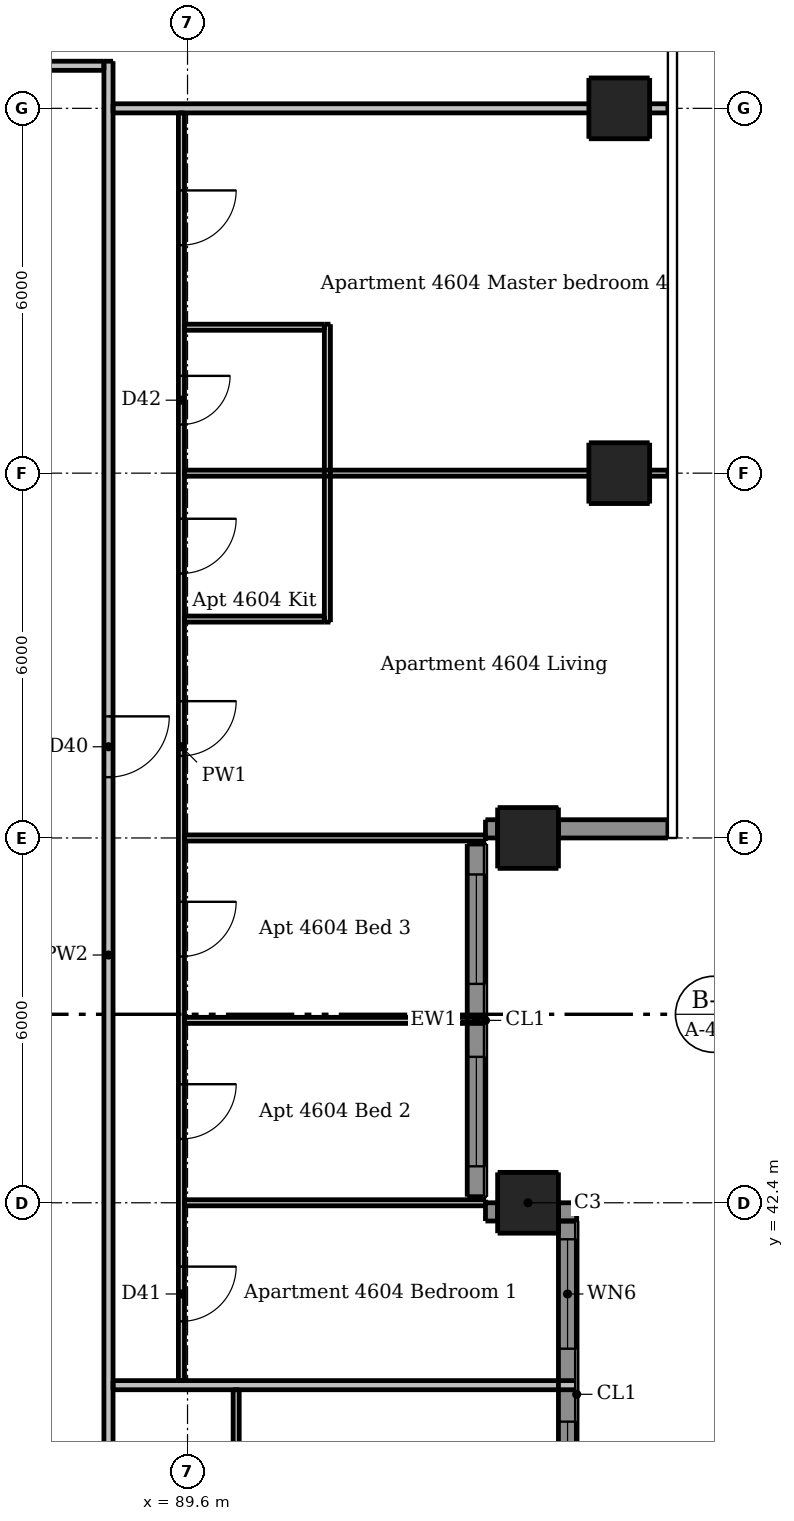
"""IFC4 building model, lengths in metres.
Left out: names, types, materials, properties, quantities, classifications, styles, units other than length and angle.
Written with IfcOpenShell. Run it as: python <this file> out.ifc"""

import sys

from ifc_helpers import new_model, si_unit, direction, frame, frame_2d, origin, origin_2d, place, context, subcontext, project, spatial, rectangle, extrude, element, fill, save


model = new_model("IFC4")
c1 = context("Model", 3, precision=1e-05, world=origin(), true_north=direction((0.0, 1.0)))
c2 = subcontext(c1, "Body", "Model", "MODEL_VIEW")
j1 = project(units=[si_unit("LENGTHUNIT", "METRE"), si_unit("PLANEANGLEUNIT", "RADIAN")], contexts=[c1])
p1 = place(None, origin())
s1 = spatial("IfcSite", under=j1, at=p1, CompositionType="ELEMENT")
p2 = place(p1, origin())
s2 = spatial("IfcBuilding", under=s1, at=p2, CompositionType="ELEMENT")
p3 = place(p2, frame((0.0, 0.0, 171.4)))
s3 = spatial("IfcBuildingStorey", under=s2, at=p3, CompositionType="ELEMENT", Elevation=171.4)
for number, where, z_axis, x_axis in (
    (1, (95.2, 42.4, 0.0), (0.0, 0.0, 1.0), (1.0, 0.0, 0.0)),
    (2, (95.2, 48.4, 0.0), (0.0, 0.0, 1.0), (1.0, 0.0, 0.0)),
    (3, (96.7, 54.4, 0.0), (0.0, 0.0, 1.0), (1.0, 0.0, 0.0)),
    (4, (96.7, 60.4, 0.0), (0.0, 0.0, 1.0), (1.0, 0.0, 0.0)),
):
    element("IfcColumn", number, at=place(p3, frame(where, z_axis=z_axis, x_axis=x_axis)), inside=s3, PredefinedType="COLUMN", context=c2, shape_type="SweptSolid", body=[
        extrude(rectangle(XDim=1.0, YDim=1.0, at=origin_2d()), origin(), (0.0, 0.0, 1.0), 3.05),
    ])
p4 = place(p3, frame((96.0, 42.25, 0.0), z_axis=(0.0, 0.0, 1.0), x_axis=(-1.0, 0.0, 0.0)))
e5 = element("IfcWall", 5, at=p4, inside=s3, PredefinedType="SOLIDWALL", context=c2, shape_type="SweptSolid", body=[
    extrude(rectangle(XDim=0.3, YDim=0.3, at=frame_2d((0.15, 0.0))), origin(), (0.0, 0.0, 1.0), 3.05),
])
for number, where, z_axis, x_axis in (
    (6, (94.7, 42.25, 0.0), (0.0, 0.0, 1.0), (-1.0, 0.0, 0.0)),
    (7, (94.5, 48.55, 0.0), (0.0, 0.0, 1.0), (1.0, 0.0, 0.0)),
):
    element("IfcWall", number, at=place(p3, frame(where, z_axis=z_axis, x_axis=x_axis)), inside=s3, PredefinedType="SOLIDWALL", context=c2, shape_type="SweptSolid", body=[
        extrude(rectangle(XDim=0.2, YDim=0.3, at=frame_2d((0.1, 0.0))), origin(), (0.0, 0.0, 1.0), 3.05),
    ])
p5 = place(p3, frame((95.7, 48.55, 0.0), z_axis=(0.0, 0.0, 1.0), x_axis=(1.0, 0.0, 0.0)))
e8 = element("IfcWall", 8, at=p5, inside=s3, PredefinedType="SOLIDWALL", context=c2, shape_type="SweptSolid", body=[
    extrude(rectangle(XDim=1.8, YDim=0.3, at=frame_2d((0.9, 0.0))), origin(), (0.0, 0.0, 1.0), 3.05),
])
p6 = place(p3, frame((95.85, 36.4, 0.0), z_axis=(0.0, 0.0, 1.0), x_axis=(0.0, 1.0, 0.0)))
e9 = element("IfcWall", 9, at=p6, inside=s3, PredefinedType="SOLIDWALL", context=c2, shape_type="SweptSolid", body=[
    extrude(rectangle(XDim=5.7, YDim=0.3, at=frame_2d((2.85, 0.0))), origin(), (0.0, 0.0, 1.0), 3.05),
])
p7 = place(p6, frame((0.6, 0.0, 0.15)))
e10 = element("IfcOpeningElement", 10, at=p7, cuts=e9, PredefinedType="OPENING", context=c2, shape_type="SweptSolid", body=[
    extrude(rectangle(XDim=1.8, YDim=2.1, at=frame_2d((0.9, 1.05))), frame((0.0, 0.16, 0.0), z_axis=(0.0, -1.0, 0.0), x_axis=(1.0, 0.0, 0.0)), (0.0, 0.0, 1.0), 0.32),
])
p8 = place(p6, frame((3.6, 0.0, 0.15)))
e11 = element("IfcOpeningElement", 11, at=p8, cuts=e9, PredefinedType="OPENING", context=c2, shape_type="SweptSolid", body=[
    extrude(rectangle(XDim=1.8, YDim=2.1, at=frame_2d((0.9, 1.05))), frame((0.0, 0.16, 0.0), z_axis=(0.0, -1.0, 0.0), x_axis=(1.0, 0.0, 0.0)), (0.0, 0.0, 1.0), 0.32),
])
p9 = place(p3, frame((94.35, 42.5, 0.0), z_axis=(0.0, 0.0, 1.0), x_axis=(0.0, 1.0, 0.0)))
e12 = element("IfcWall", 12, at=p9, inside=s3, PredefinedType="SOLIDWALL", context=c2, shape_type="SweptSolid", body=[
    extrude(rectangle(XDim=5.8, YDim=0.3, at=frame_2d((2.9, 0.0))), origin(), (0.0, 0.0, 1.0), 3.05),
])
p10 = place(p9, frame((0.5, 0.0, 0.15)))
e13 = element("IfcOpeningElement", 13, at=p10, cuts=e12, PredefinedType="OPENING", context=c2, shape_type="SweptSolid", body=[
    extrude(rectangle(XDim=1.8, YDim=2.1, at=frame_2d((0.9, 1.05))), frame((0.0, 0.16, 0.0), z_axis=(0.0, -1.0, 0.0), x_axis=(1.0, 0.0, 0.0)), (0.0, 0.0, 1.0), 0.32),
])
p11 = place(p9, frame((3.5, 0.0, 0.15)))
e14 = element("IfcOpeningElement", 14, at=p11, cuts=e12, PredefinedType="OPENING", context=c2, shape_type="SweptSolid", body=[
    extrude(rectangle(XDim=1.8, YDim=2.1, at=frame_2d((0.9, 1.05))), frame((0.0, 0.16, 0.0), z_axis=(0.0, -1.0, 0.0), x_axis=(1.0, 0.0, 0.0)), (0.0, 0.0, 1.0), 0.32),
])
p12 = place(p3, frame((89.5, 60.325, 0.0), z_axis=(0.0, 0.0, 1.0), x_axis=(0.0, -1.0, 0.0)))
e15 = element("IfcWall", 15, at=p12, inside=s3, PredefinedType="PARTITIONING", context=c2, shape_type="SweptSolid", body=[
    extrude(rectangle(XDim=20.85, YDim=0.1, at=frame_2d((10.425, 0.0))), origin(), (0.0, 0.0, 1.0), 2.51),
])
p13 = place(p12, frame((9.675, 0.0, 0.0)))
e16 = element("IfcOpeningElement", 16, at=p13, cuts=e15, PredefinedType="OPENING", context=c2, shape_type="SweptSolid", body=[
    extrude(rectangle(XDim=0.9, YDim=2.1, at=frame_2d((0.45, 1.05))), frame((0.0, 0.06, 0.0), z_axis=(0.0, -1.0, 0.0), x_axis=(1.0, 0.0, 0.0)), (0.0, 0.0, 1.0), 0.12),
])
p14 = place(p12, frame((6.675, 0.0, 0.0)))
e17 = element("IfcOpeningElement", 17, at=p14, cuts=e15, PredefinedType="OPENING", context=c2, shape_type="SweptSolid", body=[
    extrude(rectangle(XDim=0.9, YDim=2.1, at=frame_2d((0.45, 1.05))), frame((0.0, 0.06, 0.0), z_axis=(0.0, -1.0, 0.0), x_axis=(1.0, 0.0, 0.0)), (0.0, 0.0, 1.0), 0.12),
])
p15 = place(p12, frame((18.975, 0.0, 0.0)))
e18 = element("IfcOpeningElement", 18, at=p15, cuts=e15, PredefinedType="OPENING", context=c2, shape_type="SweptSolid", body=[
    extrude(rectangle(XDim=0.9, YDim=2.1, at=frame_2d((0.45, 1.05))), frame((0.0, 0.06, 0.0), z_axis=(0.0, -1.0, 0.0), x_axis=(1.0, 0.0, 0.0)), (0.0, 0.0, 1.0), 0.12),
])
p16 = place(p12, frame((15.975, 0.0, 0.0)))
e19 = element("IfcOpeningElement", 19, at=p16, cuts=e15, PredefinedType="OPENING", context=c2, shape_type="SweptSolid", body=[
    extrude(rectangle(XDim=0.9, YDim=2.1, at=frame_2d((0.45, 1.05))), frame((0.0, 0.06, 0.0), z_axis=(0.0, -1.0, 0.0), x_axis=(1.0, 0.0, 0.0)), (0.0, 0.0, 1.0), 0.12),
])
p17 = place(p12, frame((12.975, 0.0, 0.0)))
e20 = element("IfcOpeningElement", 20, at=p17, cuts=e15, PredefinedType="OPENING", context=c2, shape_type="SweptSolid", body=[
    extrude(rectangle(XDim=0.9, YDim=2.1, at=frame_2d((0.45, 1.05))), frame((0.0, 0.06, 0.0), z_axis=(0.0, -1.0, 0.0), x_axis=(1.0, 0.0, 0.0)), (0.0, 0.0, 1.0), 0.12),
])
p18 = place(p12, frame((1.275, 0.0, 0.0)))
e21 = element("IfcOpeningElement", 21, at=p18, cuts=e15, PredefinedType="OPENING", context=c2, shape_type="SweptSolid", body=[
    extrude(rectangle(XDim=0.9, YDim=2.1, at=frame_2d((0.45, 1.05))), frame((0.0, 0.06, 0.0), z_axis=(0.0, -1.0, 0.0), x_axis=(1.0, 0.0, 0.0)), (0.0, 0.0, 1.0), 0.12),
])
p19 = place(p12, frame((4.325, 0.0, 0.0)))
e22 = element("IfcOpeningElement", 22, at=p19, cuts=e15, PredefinedType="OPENING", context=c2, shape_type="SweptSolid", body=[
    extrude(rectangle(XDim=0.8, YDim=2.1, at=frame_2d((0.4, 1.05))), frame((0.0, 0.06, 0.0), z_axis=(0.0, -1.0, 0.0), x_axis=(1.0, 0.0, 0.0)), (0.0, 0.0, 1.0), 0.12),
])
p20 = place(p3, frame((90.4, 33.45, 0.0), z_axis=(0.0, 0.0, 1.0), x_axis=(0.0, 1.0, 0.0)))
e23 = element("IfcWall", 23, at=p20, inside=s3, PredefinedType="PARTITIONING", context=c2, shape_type="SweptSolid", body=[
    extrude(rectangle(XDim=5.875, YDim=0.1, at=frame_2d((2.938, 0.0))), origin(), (0.0, 0.0, 1.0), 3.05),
])
p21 = place(p20, frame((3.75, 0.0, 0.0)))
e24 = element("IfcOpeningElement", 24, at=p21, cuts=e23, PredefinedType="OPENING", context=c2, shape_type="SweptSolid", body=[
    extrude(rectangle(XDim=0.8, YDim=2.1, at=frame_2d((0.4, 1.05))), frame((0.0, 0.06, 0.0), z_axis=(0.0, -1.0, 0.0), x_axis=(1.0, 0.0, 0.0)), (0.0, 0.0, 1.0), 0.12),
])
p22 = place(p3, frame((91.9, 51.95, 0.0), z_axis=(0.0, 0.0, 1.0), x_axis=(0.0, 1.0, 0.0)))
e25 = element("IfcWall", 25, at=p22, inside=s3, PredefinedType="PARTITIONING", context=c2, shape_type="SweptSolid", body=[
    extrude(rectangle(XDim=4.9, YDim=0.1, at=frame_2d((2.45, 0.0))), origin(), (0.0, 0.0, 1.0), 3.05),
])
p23 = place(p3, frame((89.55, 56.8, 0.0), z_axis=(0.0, 0.0, 1.0), x_axis=(1.0, 0.0, 0.0)))
e26 = element("IfcWall", 26, at=p23, inside=s3, PredefinedType="PARTITIONING", context=c2, shape_type="SweptSolid", body=[
    extrude(rectangle(XDim=2.3, YDim=0.1, at=frame_2d((1.15, 0.0))), origin(), (0.0, 0.0, 1.0), 3.05),
])
p24 = place(p3, frame((89.55, 54.4, 0.0), z_axis=(0.0, 0.0, 1.0), x_axis=(1.0, 0.0, 0.0)))
e27 = element("IfcWall", 27, at=p24, inside=s3, PredefinedType="PARTITIONING", context=c2, shape_type="SweptSolid", body=[
    extrude(rectangle(XDim=7.95, YDim=0.1, at=frame_2d((3.975, 0.0))), origin(), (0.0, 0.0, 1.0), 2.516),
])
p25 = place(p3, frame((89.55, 52.0, 0.0), z_axis=(0.0, 0.0, 1.0), x_axis=(1.0, 0.0, 0.0)))
e28 = element("IfcWall", 28, at=p25, inside=s3, PredefinedType="PARTITIONING", context=c2, shape_type="SweptSolid", body=[
    extrude(rectangle(XDim=2.3, YDim=0.1, at=frame_2d((1.15, 0.0))), origin(), (0.0, 0.0, 1.0), 3.05),
])
p26 = place(p3, frame((89.55, 48.4, 0.0), z_axis=(0.0, 0.0, 1.0), x_axis=(1.0, 0.0, 0.0)))
e29 = element("IfcWall", 29, at=p26, inside=s3, PredefinedType="PARTITIONING", context=c2, shape_type="SweptSolid", body=[
    extrude(rectangle(XDim=4.95, YDim=0.1, at=frame_2d((2.475, 0.0))), origin(), (0.0, 0.0, 1.0), 2.59),
])
p27 = place(p3, frame((89.55, 45.4, 0.0), z_axis=(0.0, 0.0, 1.0), x_axis=(1.0, 0.0, 0.0)))
e30 = element("IfcWall", 30, at=p27, inside=s3, PredefinedType="PARTITIONING", context=c2, shape_type="SweptSolid", body=[
    extrude(rectangle(XDim=4.95, YDim=0.1, at=frame_2d((2.475, 0.0))), origin(), (0.0, 0.0, 1.0), 3.05),
])
p28 = place(p3, frame((89.55, 42.4, 0.0), z_axis=(0.0, 0.0, 1.0), x_axis=(1.0, 0.0, 0.0)))
e31 = element("IfcWall", 31, at=p28, inside=s3, PredefinedType="PARTITIONING", context=c2, shape_type="SweptSolid", body=[
    extrude(rectangle(XDim=4.95, YDim=0.1, at=frame_2d((2.475, 0.0))), origin(), (0.0, 0.0, 1.0), 2.59),
])
p29 = place(p3, frame((88.3, 61.175, 0.0), z_axis=(0.0, 0.0, 1.0), x_axis=(0.0, -1.0, 0.0)))
e32 = element("IfcWall", 32, at=p29, inside=s3, PredefinedType="PARTITIONING", context=c2, shape_type="SweptSolid", body=[
    extrude(rectangle(XDim=29.4, YDim=0.15, at=frame_2d((14.7, 0.0))), origin(), (0.0, 0.0, 1.0), 3.05),
])
p30 = place(p29, frame((28.125, 0.0, 0.0)))
e33 = element("IfcOpeningElement", 33, at=p30, cuts=e32, PredefinedType="OPENING", context=c2, shape_type="SweptSolid", body=[
    extrude(rectangle(XDim=1.0, YDim=2.1, at=frame_2d((0.5, 1.05))), frame((0.0, 0.085, 0.0), z_axis=(0.0, -1.0, 0.0), x_axis=(1.0, 0.0, 0.0)), (0.0, 0.0, 1.0), 0.17),
])
p31 = place(p29, frame((10.775, 0.0, 0.0)))
e34 = element("IfcOpeningElement", 34, at=p31, cuts=e32, PredefinedType="OPENING", context=c2, shape_type="SweptSolid", body=[
    extrude(rectangle(XDim=1.0, YDim=2.1, at=frame_2d((0.5, 1.05))), frame((0.0, 0.085, 0.0), z_axis=(0.0, -1.0, 0.0), x_axis=(1.0, 0.0, 0.0)), (0.0, 0.0, 1.0), 0.17),
])
p32 = place(p3, frame((58.975, 61.1, 0.0), z_axis=(0.0, 0.0, 1.0), x_axis=(1.0, 0.0, 0.0)))
e35 = element("IfcWall", 35, at=p32, inside=s3, PredefinedType="PARTITIONING", context=c2, shape_type="SweptSolid", body=[
    extrude(rectangle(XDim=29.25, YDim=0.15, at=frame_2d((14.625, 0.0))), origin(), (0.0, 0.0, 1.0), 3.05),
])
p33 = place(p32, frame((9.125, 0.0, 0.0)))
e36 = element("IfcOpeningElement", 36, at=p33, cuts=e35, PredefinedType="OPENING", context=c2, shape_type="SweptSolid", body=[
    extrude(rectangle(XDim=1.0, YDim=2.1, at=frame_2d((0.5, 1.05))), frame((0.0, 0.085, 0.0), z_axis=(0.0, -1.0, 0.0), x_axis=(1.0, 0.0, 0.0)), (0.0, 0.0, 1.0), 0.17),
])
p34 = place(p32, frame((26.475, 0.0, 0.0)))
e37 = element("IfcOpeningElement", 37, at=p34, cuts=e35, PredefinedType="OPENING", context=c2, shape_type="SweptSolid", body=[
    extrude(rectangle(XDim=1.0, YDim=2.1, at=frame_2d((0.5, 1.05))), frame((0.0, 0.085, 0.0), z_axis=(0.0, -1.0, 0.0), x_axis=(1.0, 0.0, 0.0)), (0.0, 0.0, 1.0), 0.17),
])
p35 = place(p3, frame((88.375, 60.4, 0.0), z_axis=(0.0, 0.0, 1.0), x_axis=(1.0, 0.0, 0.0)))
e38 = element("IfcWall", 38, at=p35, inside=s3, PredefinedType="PARTITIONING", context=c2, shape_type="SweptSolid", body=[
    extrude(rectangle(XDim=9.125, YDim=0.15, at=frame_2d((4.562, 0.0))), origin(), (0.0, 0.0, 1.0), 2.647),
])
p36 = place(p3, frame((88.375, 39.4, 0.0), z_axis=(0.0, 0.0, 1.0), x_axis=(1.0, 0.0, 0.0)))
e39 = element("IfcWall", 39, at=p36, inside=s3, PredefinedType="PARTITIONING", context=c2, shape_type="SweptSolid", body=[
    extrude(rectangle(XDim=7.625, YDim=0.15, at=frame_2d((3.812, 0.0))), origin(), (0.0, 0.0, 1.0), 3.05),
])
p37 = place(p7, origin())
e40 = element("IfcWindow", 40, at=p37, inside=s3, PartitioningType="DOUBLE_PANEL_VERTICAL", PredefinedType="WINDOW", context=c2, shape_type="SweptSolid", body=[
    extrude(rectangle(XDim=1.8, YDim=2.1, at=frame_2d((0.9, 1.05))), frame((0.0, 0.03, 0.0), z_axis=(0.0, -1.0, 0.0), x_axis=(1.0, 0.0, 0.0)), (0.0, 0.0, 1.0), 0.06),
])
fill(e10, e40)
p38 = place(p8, origin())
e41 = element("IfcWindow", 41, at=p38, inside=s3, PartitioningType="DOUBLE_PANEL_VERTICAL", PredefinedType="WINDOW", context=c2, shape_type="SweptSolid", body=[
    extrude(rectangle(XDim=1.8, YDim=2.1, at=frame_2d((0.9, 1.05))), frame((0.0, 0.03, 0.0), z_axis=(0.0, -1.0, 0.0), x_axis=(1.0, 0.0, 0.0)), (0.0, 0.0, 1.0), 0.06),
])
fill(e11, e41)
p39 = place(p10, origin())
e42 = element("IfcWindow", 42, at=p39, inside=s3, PartitioningType="DOUBLE_PANEL_VERTICAL", PredefinedType="WINDOW", context=c2, shape_type="SweptSolid", body=[
    extrude(rectangle(XDim=1.8, YDim=2.1, at=frame_2d((0.9, 1.05))), frame((0.0, 0.03, 0.0), z_axis=(0.0, -1.0, 0.0), x_axis=(1.0, 0.0, 0.0)), (0.0, 0.0, 1.0), 0.06),
])
fill(e13, e42)
p40 = place(p11, origin())
e43 = element("IfcWindow", 43, at=p40, inside=s3, PartitioningType="DOUBLE_PANEL_VERTICAL", PredefinedType="WINDOW", context=c2, shape_type="SweptSolid", body=[
    extrude(rectangle(XDim=1.8, YDim=2.1, at=frame_2d((0.9, 1.05))), frame((0.0, 0.03, 0.0), z_axis=(0.0, -1.0, 0.0), x_axis=(1.0, 0.0, 0.0)), (0.0, 0.0, 1.0), 0.06),
])
fill(e14, e43)
p41 = place(p31, origin())
e44 = element("IfcDoor", 44, at=p41, inside=s3, OperationType="SINGLE_SWING_LEFT", PredefinedType="DOOR", context=c2, shape_type="SweptSolid", body=[
    extrude(rectangle(XDim=1.0, YDim=2.1, at=frame_2d((0.5, 1.05))), frame((0.0, 0.025, 0.0), z_axis=(0.0, -1.0, 0.0), x_axis=(1.0, 0.0, 0.0)), (0.0, 0.0, 1.0), 0.05),
])
fill(e34, e44)
p42 = place(p13, origin())
e45 = element("IfcDoor", 45, at=p42, inside=s3, OperationType="SINGLE_SWING_LEFT", PredefinedType="DOOR", context=c2, shape_type="SweptSolid", body=[
    extrude(rectangle(XDim=0.9, YDim=2.1, at=frame_2d((0.45, 1.05))), frame((0.0, 0.025, 0.0), z_axis=(0.0, -1.0, 0.0), x_axis=(1.0, 0.0, 0.0)), (0.0, 0.0, 1.0), 0.05),
])
fill(e16, e45)
p43 = place(p14, origin())
e46 = element("IfcDoor", 46, at=p43, inside=s3, OperationType="SINGLE_SWING_LEFT", PredefinedType="DOOR", context=c2, shape_type="SweptSolid", body=[
    extrude(rectangle(XDim=0.9, YDim=2.1, at=frame_2d((0.45, 1.05))), frame((0.0, 0.025, 0.0), z_axis=(0.0, -1.0, 0.0), x_axis=(1.0, 0.0, 0.0)), (0.0, 0.0, 1.0), 0.05),
])
fill(e17, e46)
p44 = place(p15, origin())
e47 = element("IfcDoor", 47, at=p44, inside=s3, OperationType="SINGLE_SWING_LEFT", PredefinedType="DOOR", context=c2, shape_type="SweptSolid", body=[
    extrude(rectangle(XDim=0.9, YDim=2.1, at=frame_2d((0.45, 1.05))), frame((0.0, 0.025, 0.0), z_axis=(0.0, -1.0, 0.0), x_axis=(1.0, 0.0, 0.0)), (0.0, 0.0, 1.0), 0.05),
])
fill(e18, e47)
p45 = place(p16, origin())
e48 = element("IfcDoor", 48, at=p45, inside=s3, OperationType="SINGLE_SWING_LEFT", PredefinedType="DOOR", context=c2, shape_type="SweptSolid", body=[
    extrude(rectangle(XDim=0.9, YDim=2.1, at=frame_2d((0.45, 1.05))), frame((0.0, 0.025, 0.0), z_axis=(0.0, -1.0, 0.0), x_axis=(1.0, 0.0, 0.0)), (0.0, 0.0, 1.0), 0.05),
])
fill(e19, e48)
p46 = place(p17, origin())
e49 = element("IfcDoor", 49, at=p46, inside=s3, OperationType="SINGLE_SWING_LEFT", PredefinedType="DOOR", context=c2, shape_type="SweptSolid", body=[
    extrude(rectangle(XDim=0.9, YDim=2.1, at=frame_2d((0.45, 1.05))), frame((0.0, 0.025, 0.0), z_axis=(0.0, -1.0, 0.0), x_axis=(1.0, 0.0, 0.0)), (0.0, 0.0, 1.0), 0.05),
])
fill(e20, e49)
p47 = place(p18, origin())
e50 = element("IfcDoor", 50, at=p47, inside=s3, OperationType="SINGLE_SWING_LEFT", PredefinedType="DOOR", context=c2, shape_type="SweptSolid", body=[
    extrude(rectangle(XDim=0.9, YDim=2.1, at=frame_2d((0.45, 1.05))), frame((0.0, 0.025, 0.0), z_axis=(0.0, -1.0, 0.0), x_axis=(1.0, 0.0, 0.0)), (0.0, 0.0, 1.0), 0.05),
])
fill(e21, e50)
p48 = place(p19, origin())
e51 = element("IfcDoor", 51, at=p48, inside=s3, OperationType="SINGLE_SWING_LEFT", PredefinedType="DOOR", context=c2, shape_type="SweptSolid", body=[
    extrude(rectangle(XDim=0.8, YDim=2.1, at=frame_2d((0.4, 1.05))), frame((0.0, 0.025, 0.0), z_axis=(0.0, -1.0, 0.0), x_axis=(1.0, 0.0, 0.0)), (0.0, 0.0, 1.0), 0.05),
])
fill(e22, e51)
save(model, sys.argv[1])
